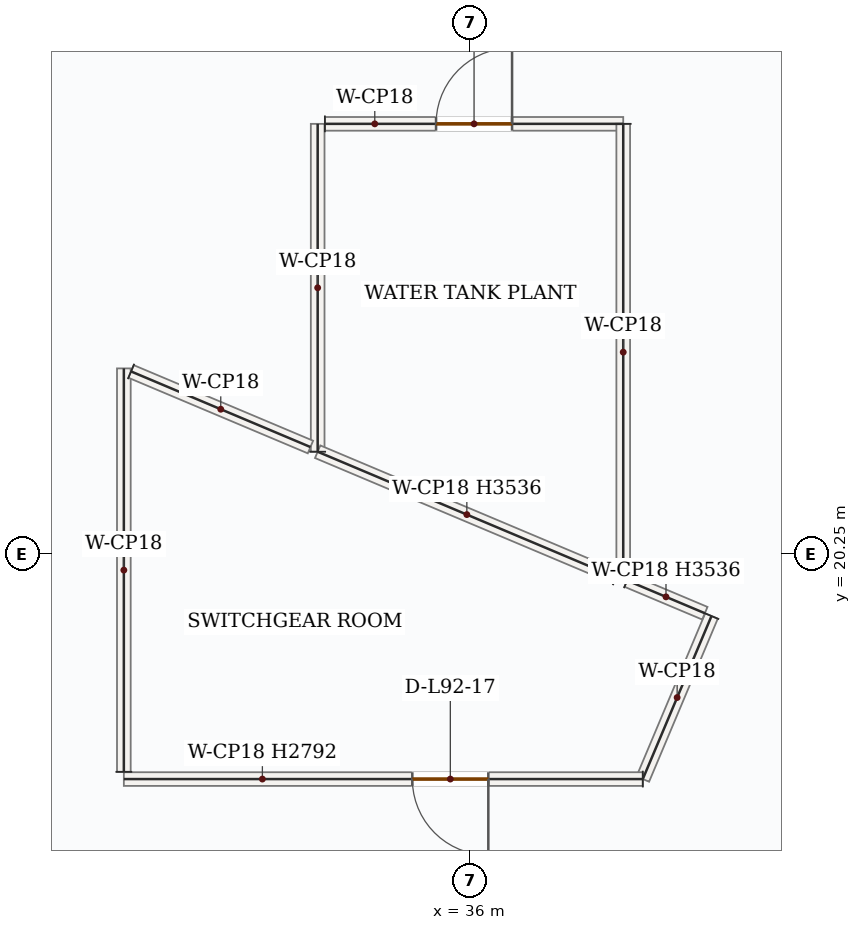
"""IFC4 building model, lengths in metres.
Left out: names, types, materials, properties, quantities, classifications, styles, units other than length and angle.
Written with IfcOpenShell. Run it as: python <this file> out.ifc"""

import sys

from ifc_helpers import new_model, si_unit, direction, frame, frame_2d, origin, place, context, subcontext, project, spatial, rectangle, extrude, source, transform, mapped, element, fill, save


model = new_model("IFC4")
c1 = context("Model", 3, precision=1e-05, world=origin(), true_north=direction((0.0, 1.0)))
c2 = subcontext(c1, "Body", "Model", "MODEL_VIEW")
j1 = project(units=[si_unit("LENGTHUNIT", "METRE"), si_unit("PLANEANGLEUNIT", "RADIAN")], contexts=[c1])
p1 = place(None, origin())
s1 = spatial("IfcSite", under=j1, at=p1, CompositionType="ELEMENT")
p2 = place(p1, origin())
s2 = spatial("IfcBuilding", under=s1, at=p2, CompositionType="ELEMENT")
p3 = place(p2, frame((0.0, 0.0, 379.65)))
s3 = spatial("IfcBuildingStorey", under=s2, at=p3, CompositionType="ELEMENT", Elevation=379.65)
m1 = source(origin(), c2, "Body", "SweptSolid", [
    extrude(rectangle(XDim=4.313, YDim=0.18, at=frame_2d((2.157, 0.0))), origin(), (0.0, 0.0, 1.0), 3.95),
])
p4 = place(p3, frame((33.99, 21.596, 0.0), z_axis=(0.0, 0.0, 1.0), x_axis=(0.0, 1.0, 0.0)))
e1 = element("IfcWall", 1, at=p4, inside=s3, PredefinedType="PARTITIONING", context=c2, shape_type="MappedRepresentation", body=[
    mapped(m1, transform((0.0, 0.0, 0.0), x_axis=(1.0, 0.0, 0.0), y_axis=(0.0, 1.0, 0.0), z_axis=(0.0, 0.0, 1.0), scale=1.0)),
])
p5 = place(p3, frame((34.085, 25.91, 0.0), z_axis=(0.0, 0.0, 1.0), x_axis=(1.0, 0.0, 0.0)))
e2 = element("IfcWall", 2, at=p5, inside=s3, PredefinedType="PARTITIONING", context=c2, shape_type="SweptSolid", body=[
    extrude(rectangle(XDim=3.925, YDim=0.18, at=frame_2d((1.962, 0.0))), origin(), (0.0, 0.0, 1.0), 3.95),
])
p6 = place(p5, frame((1.462, 0.0, 0.0)))
e3 = element("IfcOpeningElement", 3, at=p6, cuts=e2, PredefinedType="OPENING", context=c2, shape_type="SweptSolid", body=[
    extrude(rectangle(XDim=1.0, YDim=2.15, at=frame_2d((0.5, 1.075))), frame((0.0, 0.1, 0.0), z_axis=(0.0, -1.0, 0.0), x_axis=(1.0, 0.0, 0.0)), (0.0, 0.0, 1.0), 0.2),
])
m2 = source(origin(), c2, "Body", "SweptSolid", [
    extrude(rectangle(XDim=6.007, YDim=0.18, at=frame_2d((3.004, 0.0))), origin(), (0.0, 0.0, 1.0), 3.95),
])
p7 = place(p3, frame((38.01, 25.91, 0.0), z_axis=(0.0, 0.0, 1.0), x_axis=(0.0, -1.0, 0.0)))
e4 = element("IfcWall", 4, at=p7, inside=s3, PredefinedType="PARTITIONING", context=c2, shape_type="MappedRepresentation", body=[
    mapped(m2, transform((0.0, 0.0, 0.0), x_axis=(1.0, 0.0, 0.0), y_axis=(0.0, 1.0, 0.0), z_axis=(0.0, 0.0, 1.0), scale=1.0)),
])
m3 = source(origin(), c2, "Body", "SweptSolid", [
    extrude(rectangle(XDim=4.259, YDim=0.18, at=frame_2d((2.13, 0.0))), origin(), (0.0, 0.0, 1.0), 3.536),
])
p8 = place(p3, frame((37.915, 19.942, 0.0), z_axis=(0.0, 0.0, 1.0), x_axis=(-0.921517727691, 0.388336294403, 0.0)))
e5 = element("IfcWall", 5, at=p8, inside=s3, PredefinedType="PARTITIONING", context=c2, shape_type="MappedRepresentation", body=[
    mapped(m3, transform((0.0, 0.0, 0.0), x_axis=(1.0, 0.0, 0.0), y_axis=(0.0, 1.0, 0.0), z_axis=(0.0, 0.0, 1.0), scale=1.0)),
])
m4 = source(origin(), c2, "Body", "SweptSolid", [
    extrude(rectangle(XDim=2.327, YDim=0.18, at=frame_2d((1.164, 0.0))), origin(), (0.0, 0.0, 1.0), 3.95),
])
p9 = place(p3, frame((39.171, 19.435, 0.0), z_axis=(0.0, 0.0, 1.0), x_axis=(-0.388328975107, -0.921520812078, 0.0)))
e6 = element("IfcWall", 6, at=p9, inside=s3, PredefinedType="PARTITIONING", context=c2, shape_type="MappedRepresentation", body=[
    mapped(m4, transform((0.0, 0.0, 0.0), x_axis=(1.0, 0.0, 0.0), y_axis=(0.0, 1.0, 0.0), z_axis=(0.0, 0.0, 1.0), scale=1.0)),
])
p10 = place(p3, frame((38.267, 17.29, 0.0), z_axis=(0.0, 0.0, 1.0), x_axis=(-1.0, 0.0, 0.0)))
e7 = element("IfcWall", 7, at=p10, inside=s3, PredefinedType="PARTITIONING", context=c2, shape_type="SweptSolid", body=[
    extrude(rectangle(XDim=6.827, YDim=0.18, at=frame_2d((3.414, 0.0))), origin(), (0.0, 0.0, 1.0), 2.792),
])
p11 = place(p10, frame((2.032, 0.0, 0.0)))
e8 = element("IfcOpeningElement", 8, at=p11, cuts=e7, PredefinedType="OPENING", context=c2, shape_type="SweptSolid", body=[
    extrude(rectangle(XDim=1.0, YDim=2.15, at=frame_2d((0.5, 1.075))), frame((0.0, 0.1, 0.0), z_axis=(0.0, -1.0, 0.0), x_axis=(1.0, 0.0, 0.0)), (0.0, 0.0, 1.0), 0.2),
])
m5 = source(origin(), c2, "Body", "SweptSolid", [
    extrude(rectangle(XDim=5.308, YDim=0.18, at=frame_2d((2.654, 0.0))), origin(), (0.0, 0.0, 1.0), 3.95),
])
p12 = place(p3, frame((31.44, 17.385, 0.0), z_axis=(0.0, 0.0, 1.0), x_axis=(0.0, 1.0, 0.0)))
e9 = element("IfcWall", 9, at=p12, inside=s3, PredefinedType="PARTITIONING", context=c2, shape_type="MappedRepresentation", body=[
    mapped(m5, transform((0.0, 0.0, 0.0), x_axis=(1.0, 0.0, 0.0), y_axis=(0.0, 1.0, 0.0), z_axis=(0.0, 0.0, 1.0), scale=1.0)),
])
m6 = source(origin(), c2, "Body", "SweptSolid", [
    extrude(rectangle(XDim=2.561, YDim=0.18, at=frame_2d((1.281, 0.0))), origin(), (0.0, 0.0, 1.0), 3.95),
])
p13 = place(p3, frame((31.535, 22.653, 0.0), z_axis=(0.0, 0.0, 1.0), x_axis=(0.921543833829, -0.388274339008, 0.0)))
e10 = element("IfcWall", 10, at=p13, inside=s3, PredefinedType="PARTITIONING", context=c2, shape_type="MappedRepresentation", body=[
    mapped(m6, transform((0.0, 0.0, 0.0), x_axis=(1.0, 0.0, 0.0), y_axis=(0.0, 1.0, 0.0), z_axis=(0.0, 0.0, 1.0), scale=1.0)),
])
m7 = source(origin(), c2, "Body", "SweptSolid", [
    extrude(rectangle(XDim=1.109, YDim=0.18, at=frame_2d((0.555, 0.0))), origin(), (0.0, 0.0, 1.0), 3.536),
])
p14 = place(p3, frame((38.062, 19.903, 0.0), z_axis=(0.0, 0.0, 1.0), x_axis=(0.921473730863, -0.388440681866, 0.0)))
e11 = element("IfcWall", 11, at=p14, inside=s3, PredefinedType="PARTITIONING", context=c2, shape_type="MappedRepresentation", body=[
    mapped(m7, transform((0.0, 0.0, 0.0), x_axis=(1.0, 0.0, 0.0), y_axis=(0.0, 1.0, 0.0), z_axis=(0.0, 0.0, 1.0), scale=1.0)),
])
m8 = source(origin(), c2, "Body", "SweptSolid", [
    extrude(rectangle(XDim=1.0, YDim=2.15, at=frame_2d((0.5, 1.075))), frame((0.0, 0.025, 0.0), z_axis=(0.0, -1.0, 0.0), x_axis=(1.0, 0.0, 0.0)), (0.0, 0.0, 1.0), 0.05),
])
p15 = place(p11, origin())
e12 = element("IfcDoor", 12, at=p15, inside=s3, OperationType="SINGLE_SWING_LEFT", PredefinedType="DOOR", context=c2, shape_type="MappedRepresentation", body=[
    mapped(m8, transform((0.0, 0.0, 0.0), x_axis=(1.0, 0.0, 0.0), y_axis=(0.0, 1.0, 0.0), z_axis=(0.0, 0.0, 1.0), scale=1.0)),
])
fill(e8, e12)
p16 = place(p6, origin())
e13 = element("IfcDoor", 13, at=p16, inside=s3, OperationType="SINGLE_SWING_RIGHT", PredefinedType="DOOR", context=c2, shape_type="MappedRepresentation", body=[
    mapped(m8, transform((0.0, 0.0, 0.0), x_axis=(1.0, 0.0, 0.0), y_axis=(0.0, 1.0, 0.0), z_axis=(0.0, 0.0, 1.0), scale=1.0)),
])
fill(e3, e13)
save(model, sys.argv[1])
